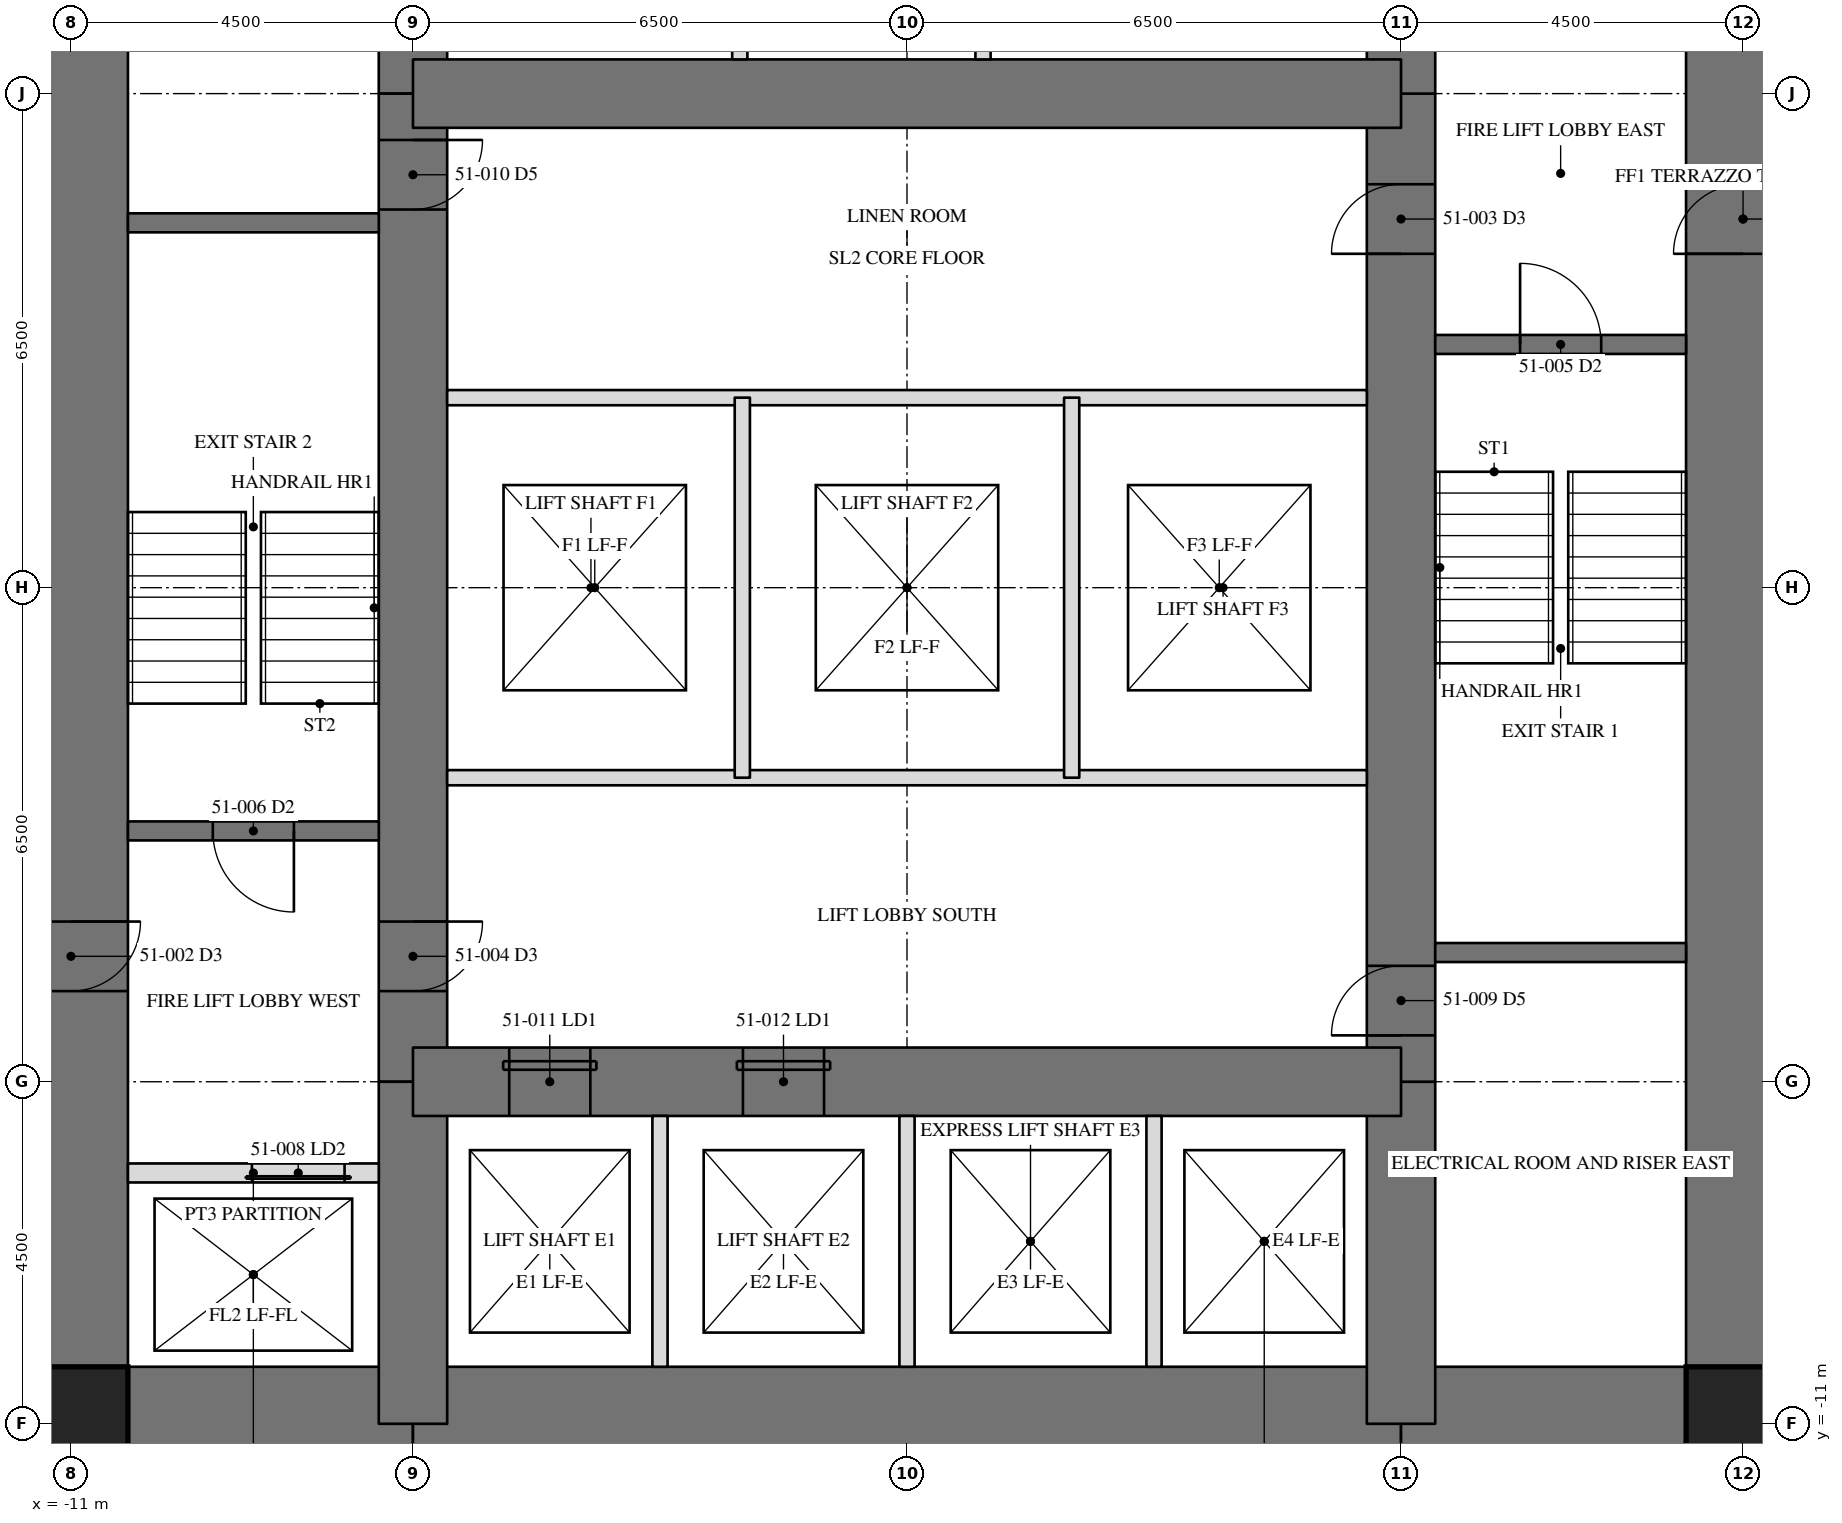
"""IFC4 building model, lengths in metres.
Left out: names, types, materials, properties, quantities, classifications, styles, units other than length and angle.
Written with IfcOpenShell. Run it as: python <this file> out.ifc"""

import sys

from ifc_helpers import new_model, si_unit, direction, frame, frame_2d, origin, origin_2d, place, context, subcontext, project, spatial, rectangle, hollow_rectangle, extrude, element, fill, save


model = new_model("IFC4")
c1 = context("Model", 3, precision=1e-05, world=origin(), true_north=direction((0.0, 1.0)))
c2 = subcontext(c1, "Body", "Model", "MODEL_VIEW")
j1 = project(units=[si_unit("LENGTHUNIT", "METRE"), si_unit("PLANEANGLEUNIT", "RADIAN")], contexts=[c1])
p1 = place(None, origin())
s1 = spatial("IfcSite", under=j1, at=p1, CompositionType="ELEMENT")
p2 = place(p1, origin())
s2 = spatial("IfcBuilding", under=s1, at=p2, CompositionType="ELEMENT")
p3 = place(p2, frame((0.0, 0.0, 215.2)))
s3 = spatial("IfcBuildingStorey", under=s2, at=p3, CompositionType="ELEMENT", Elevation=215.2)
p4 = place(p3, frame((11.0, -11.0, 0.0), z_axis=(0.0, 0.0, 1.0), x_axis=(0.0, 1.0, 0.0)))
e1 = element("IfcWall", 1, at=p4, inside=s3, PredefinedType="SHEAR", context=c2, shape_type="SweptSolid", body=[
    extrude(rectangle(XDim=22.0, YDim=1.5, at=frame_2d((11.0, 0.0))), origin(), (0.0, 0.0, 1.0), 3.5),
])
p5 = place(p4, frame((15.393, 0.0, 0.0)))
e2 = element("IfcOpeningElement", 2, at=p5, cuts=e1, PredefinedType="OPENING", context=c2, shape_type="SweptSolid", body=[
    extrude(rectangle(XDim=0.915, YDim=2.134, at=frame_2d((0.458, 1.067))), frame((0.0, 0.76, 0.0), z_axis=(0.0, -1.0, 0.0), x_axis=(1.0, 0.0, 0.0)), (0.0, 0.0, 1.0), 1.52),
])
p6 = place(p3, frame((-11.0, 11.0, 0.0), z_axis=(0.0, 0.0, 1.0), x_axis=(0.0, -1.0, 0.0)))
e3 = element("IfcWall", 3, at=p6, inside=s3, PredefinedType="SHEAR", context=c2, shape_type="SweptSolid", body=[
    extrude(rectangle(XDim=22.0, YDim=1.5, at=frame_2d((11.0, 0.0))), origin(), (0.0, 0.0, 1.0), 3.5),
])
p7 = place(p6, frame((15.393, 0.0, 0.0)))
e4 = element("IfcOpeningElement", 4, at=p7, cuts=e3, PredefinedType="OPENING", context=c2, shape_type="SweptSolid", body=[
    extrude(rectangle(XDim=0.915, YDim=2.134, at=frame_2d((0.458, 1.067))), frame((0.0, 0.76, 0.0), z_axis=(0.0, -1.0, 0.0), x_axis=(1.0, 0.0, 0.0)), (0.0, 0.0, 1.0), 1.52),
])
p8 = place(p3, frame((-11.0, -11.0, 0.0), z_axis=(0.0, 0.0, 1.0), x_axis=(1.0, 0.0, 0.0)))
e5 = element("IfcWall", 5, at=p8, inside=s3, PredefinedType="SHEAR", context=c2, shape_type="SweptSolid", body=[
    extrude(rectangle(XDim=4.5, YDim=1.5, at=frame_2d((2.25, 0.0))), origin(), (0.0, 0.0, 1.0), 3.5),
])
p9 = place(p3, frame((-6.5, -11.0, 0.0), z_axis=(0.0, 0.0, 1.0), x_axis=(1.0, 0.0, 0.0)))
e6 = element("IfcWall", 6, at=p9, inside=s3, PredefinedType="SHEAR", context=c2, shape_type="SweptSolid", body=[
    extrude(rectangle(XDim=13.0, YDim=1.5, at=frame_2d((6.5, 0.0))), origin(), (0.0, 0.0, 1.0), 3.5),
])
p10 = place(p3, frame((6.5, -11.0, 0.0), z_axis=(0.0, 0.0, 1.0), x_axis=(1.0, 0.0, 0.0)))
e7 = element("IfcWall", 7, at=p10, inside=s3, PredefinedType="SHEAR", context=c2, shape_type="SweptSolid", body=[
    extrude(rectangle(XDim=4.5, YDim=1.5, at=frame_2d((2.25, 0.0))), origin(), (0.0, 0.0, 1.0), 3.5),
])
p11 = place(p3, frame((6.5, -11.0, 0.0), z_axis=(0.0, 0.0, 1.0), x_axis=(0.0, 1.0, 0.0)))
e8 = element("IfcWall", 8, at=p11, inside=s3, PredefinedType="SHEAR", context=c2, shape_type="SweptSolid", body=[
    extrude(rectangle(XDim=4.5, YDim=0.9, at=frame_2d((2.25, 0.0))), origin(), (0.0, 0.0, 1.0), 3.5),
])
p12 = place(p3, frame((6.5, -6.5, 0.0), z_axis=(0.0, 0.0, 1.0), x_axis=(0.0, 1.0, 0.0)))
e9 = element("IfcWall", 9, at=p12, inside=s3, PredefinedType="SHEAR", context=c2, shape_type="SweptSolid", body=[
    extrude(rectangle(XDim=13.0, YDim=0.9, at=frame_2d((6.5, 0.0))), origin(), (0.0, 0.0, 1.0), 3.5),
])
p13 = place(p12, frame((10.893, 0.0, 0.0)))
e10 = element("IfcOpeningElement", 10, at=p13, cuts=e9, PredefinedType="OPENING", context=c2, shape_type="SweptSolid", body=[
    extrude(rectangle(XDim=0.915, YDim=2.134, at=frame_2d((0.458, 1.067))), frame((0.0, 0.46, 0.0), z_axis=(0.0, -1.0, 0.0), x_axis=(1.0, 0.0, 0.0)), (0.0, 0.0, 1.0), 0.92),
])
p14 = place(p12, frame((0.61, 0.0, 0.0)))
e11 = element("IfcOpeningElement", 11, at=p14, cuts=e9, PredefinedType="OPENING", context=c2, shape_type="SweptSolid", body=[
    extrude(rectangle(XDim=0.915, YDim=2.134, at=frame_2d((0.458, 1.067))), frame((0.0, 0.46, 0.0), z_axis=(0.0, -1.0, 0.0), x_axis=(1.0, 0.0, 0.0)), (0.0, 0.0, 1.0), 0.92),
])
for number, where, z_axis, x_axis in (
    (12, (6.5, 6.5, 0.0), (0.0, 0.0, 1.0), (0.0, 1.0, 0.0)),
    (13, (-6.5, 11.0, 0.0), (0.0, 0.0, 1.0), (0.0, -1.0, 0.0)),
):
    element("IfcWall", number, at=place(p3, frame(where, z_axis=z_axis, x_axis=x_axis)), inside=s3, PredefinedType="SHEAR", context=c2, shape_type="SweptSolid", body=[
        extrude(rectangle(XDim=4.5, YDim=0.9, at=frame_2d((2.25, 0.0))), origin(), (0.0, 0.0, 1.0), 3.5),
    ])
p15 = place(p3, frame((-6.5, 6.5, 0.0), z_axis=(0.0, 0.0, 1.0), x_axis=(0.0, -1.0, 0.0)))
e14 = element("IfcWall", 14, at=p15, inside=s3, PredefinedType="SHEAR", context=c2, shape_type="SweptSolid", body=[
    extrude(rectangle(XDim=13.0, YDim=0.9, at=frame_2d((6.5, 0.0))), origin(), (0.0, 0.0, 1.0), 3.5),
])
p16 = place(p15, frame((10.893, 0.0, 0.0)))
e15 = element("IfcOpeningElement", 15, at=p16, cuts=e14, PredefinedType="OPENING", context=c2, shape_type="SweptSolid", body=[
    extrude(rectangle(XDim=0.915, YDim=2.134, at=frame_2d((0.458, 1.067))), frame((0.0, 0.46, 0.0), z_axis=(0.0, -1.0, 0.0), x_axis=(1.0, 0.0, 0.0)), (0.0, 0.0, 1.0), 0.92),
])
p17 = place(p15, frame((0.61, 0.0, 0.0)))
e16 = element("IfcOpeningElement", 16, at=p17, cuts=e14, PredefinedType="OPENING", context=c2, shape_type="SweptSolid", body=[
    extrude(rectangle(XDim=0.915, YDim=2.134, at=frame_2d((0.458, 1.067))), frame((0.0, 0.46, 0.0), z_axis=(0.0, -1.0, 0.0), x_axis=(1.0, 0.0, 0.0)), (0.0, 0.0, 1.0), 0.92),
])
p18 = place(p3, frame((-6.5, -6.5, 0.0), z_axis=(0.0, 0.0, 1.0), x_axis=(0.0, -1.0, 0.0)))
e17 = element("IfcWall", 17, at=p18, inside=s3, PredefinedType="SHEAR", context=c2, shape_type="SweptSolid", body=[
    extrude(rectangle(XDim=4.5, YDim=0.9, at=frame_2d((2.25, 0.0))), origin(), (0.0, 0.0, 1.0), 3.5),
])
p19 = place(p3, frame((6.5, 6.5, 0.0), z_axis=(0.0, 0.0, 1.0), x_axis=(-1.0, 0.0, 0.0)))
e18 = element("IfcWall", 18, at=p19, inside=s3, PredefinedType="SHEAR", context=c2, shape_type="SweptSolid", body=[
    extrude(rectangle(XDim=13.0, YDim=0.9, at=frame_2d((6.5, 0.0))), origin(), (0.0, 0.0, 1.0), 3.5),
])
p20 = place(p3, frame((-6.5, -6.5, 0.0), z_axis=(0.0, 0.0, 1.0), x_axis=(1.0, 0.0, 0.0)))
e19 = element("IfcWall", 19, at=p20, inside=s3, PredefinedType="SHEAR", context=c2, shape_type="SweptSolid", body=[
    extrude(rectangle(XDim=13.0, YDim=0.9, at=frame_2d((6.5, 0.0))), origin(), (0.0, 0.0, 1.0), 3.5),
])
p21 = place(p20, frame((1.267, 0.0, 0.0)))
e20 = element("IfcOpeningElement", 20, at=p21, cuts=e19, PredefinedType="OPENING", context=c2, shape_type="SweptSolid", body=[
    extrude(rectangle(XDim=1.067, YDim=2.134, at=frame_2d((0.533, 1.067))), frame((0.0, 0.46, 0.0), z_axis=(0.0, -1.0, 0.0), x_axis=(1.0, 0.0, 0.0)), (0.0, 0.0, 1.0), 0.92),
])
p22 = place(p20, frame((4.342, 0.0, 0.0)))
e21 = element("IfcOpeningElement", 21, at=p22, cuts=e19, PredefinedType="OPENING", context=c2, shape_type="SweptSolid", body=[
    extrude(rectangle(XDim=1.067, YDim=2.134, at=frame_2d((0.533, 1.067))), frame((0.0, 0.46, 0.0), z_axis=(0.0, -1.0, 0.0), x_axis=(1.0, 0.0, 0.0)), (0.0, 0.0, 1.0), 0.92),
])
for number, where, z_axis, x_axis in (
    (22, (-11.0, -11.0, 0.0), (0.0, 0.0, 1.0), (1.0, 0.0, 0.0)),
    (23, (11.0, -11.0, 0.0), (0.0, 0.0, 1.0), (1.0, 0.0, 0.0)),
):
    element("IfcColumn", number, at=place(p3, frame(where, z_axis=z_axis, x_axis=x_axis)), inside=s3, PredefinedType="COLUMN", context=c2, shape_type="SweptSolid", body=[
        extrude(hollow_rectangle(XDim=1.499, YDim=1.499, WallThickness=0.102, at=origin_2d()), origin(), (0.0, 0.0, 1.0), 3.5),
    ])
for number, where, z_axis, x_axis in (
    (24, (6.95, -4.8, 0.0), (0.0, 0.0, 1.0), (1.0, 0.0, 0.0)),
    (25, (-6.95, 4.8, 0.0), (0.0, 0.0, 1.0), (-1.0, 0.0, 0.0)),
):
    element("IfcWall", number, at=place(p3, frame(where, z_axis=z_axis, x_axis=x_axis)), inside=s3, PredefinedType="SOLIDWALL", context=c2, shape_type="SweptSolid", body=[
        extrude(rectangle(XDim=3.3, YDim=0.25, at=frame_2d((1.65, 0.0))), origin(), (0.0, 0.0, 1.0), 3.31),
    ])
p23 = place(p3, frame((6.95, 3.2, 0.0), z_axis=(0.0, 0.0, 1.0), x_axis=(1.0, 0.0, 0.0)))
e26 = element("IfcWall", 26, at=p23, inside=s3, PredefinedType="SOLIDWALL", context=c2, shape_type="SweptSolid", body=[
    extrude(rectangle(XDim=3.3, YDim=0.25, at=frame_2d((1.65, 0.0))), origin(), (0.0, 0.0, 1.0), 3.31),
])
p24 = place(p23, frame((1.116, 0.0, 0.0)))
e27 = element("IfcOpeningElement", 27, at=p24, cuts=e26, PredefinedType="OPENING", context=c2, shape_type="SweptSolid", body=[
    extrude(rectangle(XDim=1.067, YDim=2.134, at=frame_2d((0.533, 1.067))), frame((0.0, 0.135, 0.0), z_axis=(0.0, -1.0, 0.0), x_axis=(1.0, 0.0, 0.0)), (0.0, 0.0, 1.0), 0.27),
])
p25 = place(p3, frame((-6.95, -3.2, 0.0), z_axis=(0.0, 0.0, 1.0), x_axis=(-1.0, 0.0, 0.0)))
e28 = element("IfcWall", 28, at=p25, inside=s3, PredefinedType="SOLIDWALL", context=c2, shape_type="SweptSolid", body=[
    extrude(rectangle(XDim=3.3, YDim=0.25, at=frame_2d((1.65, 0.0))), origin(), (0.0, 0.0, 1.0), 3.31),
])
p26 = place(p25, frame((1.116, 0.0, 0.0)))
e29 = element("IfcOpeningElement", 29, at=p26, cuts=e28, PredefinedType="OPENING", context=c2, shape_type="SweptSolid", body=[
    extrude(rectangle(XDim=1.067, YDim=2.134, at=frame_2d((0.533, 1.067))), frame((0.0, 0.135, 0.0), z_axis=(0.0, -1.0, 0.0), x_axis=(1.0, 0.0, 0.0)), (0.0, 0.0, 1.0), 0.27),
])
p27 = place(p3, frame((-6.95, -7.7, 0.0), z_axis=(0.0, 0.0, 1.0), x_axis=(-1.0, 0.0, 0.0)))
e30 = element("IfcWall", 30, at=p27, inside=s3, PredefinedType="PARTITIONING", context=c2, shape_type="SweptSolid", body=[
    extrude(rectangle(XDim=3.3, YDim=0.25, at=frame_2d((1.65, 0.0))), origin(), (0.0, 0.0, 1.0), 3.31),
])
p28 = place(p27, frame((0.45, 0.0, 0.0)))
e31 = element("IfcOpeningElement", 31, at=p28, cuts=e30, PredefinedType="OPENING", context=c2, shape_type="SweptSolid", body=[
    extrude(rectangle(XDim=1.219, YDim=2.134, at=frame_2d((0.609, 1.067))), frame((0.0, 0.135, 0.0), z_axis=(0.0, -1.0, 0.0), x_axis=(1.0, 0.0, 0.0)), (0.0, 0.0, 1.0), 0.27),
])
for number, where, z_axis, x_axis in (
    (32, (-6.05, 2.5, 0.0), (0.0, 0.0, 1.0), (1.0, 0.0, 0.0)),
    (33, (6.05, -2.5, 0.0), (0.0, 0.0, 1.0), (-1.0, 0.0, 0.0)),
):
    element("IfcWall", number, at=place(p3, frame(where, z_axis=z_axis, x_axis=x_axis)), inside=s3, PredefinedType="PARTITIONING", context=c2, shape_type="SweptSolid", body=[
        extrude(rectangle(XDim=12.1, YDim=0.2, at=frame_2d((6.05, 0.0))), origin(), (0.0, 0.0, 1.0), 3.31),
    ])
for number, where, z_axis, x_axis in (
    (34, (-3.25, -10.25, 0.0), (0.0, 0.0, 1.0), (0.0, 1.0, 0.0)),
    (35, (0.0, -10.25, 0.0), (0.0, 0.0, 1.0), (0.0, 1.0, 0.0)),
    (36, (3.25, -10.25, 0.0), (0.0, 0.0, 1.0), (0.0, 1.0, 0.0)),
):
    element("IfcWall", number, at=place(p3, frame(where, z_axis=z_axis, x_axis=x_axis)), inside=s3, PredefinedType="PARTITIONING", context=c2, shape_type="SweptSolid", body=[
        extrude(rectangle(XDim=3.3, YDim=0.2, at=frame_2d((1.65, 0.0))), origin(), (0.0, 0.0, 1.0), 3.31),
    ])
for number, where, z_axis, x_axis in (
    (37, (-2.167, -2.5, 0.0), (0.0, 0.0, 1.0), (0.0, 1.0, 0.0)),
    (38, (2.167, -2.5, 0.0), (0.0, 0.0, 1.0), (0.0, 1.0, 0.0)),
):
    element("IfcWall", number, at=place(p3, frame(where, z_axis=z_axis, x_axis=x_axis)), inside=s3, PredefinedType="PARTITIONING", context=c2, shape_type="SweptSolid", body=[
        extrude(rectangle(XDim=5.0, YDim=0.2, at=frame_2d((2.5, 0.0))), origin(), (0.0, 0.0, 1.0), 3.31),
    ])
p29 = place(p3, frame((-2.2, 6.95, 0.0), z_axis=(0.0, 0.0, 1.0), x_axis=(0.0, 1.0, 0.0)))
e39 = element("IfcWall", 39, at=p29, inside=s3, PredefinedType="PARTITIONING", context=c2, shape_type="SweptSolid", body=[
    extrude(rectangle(XDim=3.3, YDim=0.2, at=frame_2d((1.65, 0.0))), origin(), (0.0, 0.0, 1.0), 3.31),
])
p30 = place(p29, frame((1.192, 0.0, 0.0)))
e40 = element("IfcOpeningElement", 40, at=p30, cuts=e39, PredefinedType="OPENING", context=c2, shape_type="SweptSolid", body=[
    extrude(rectangle(XDim=0.915, YDim=2.134, at=frame_2d((0.458, 1.067))), frame((0.0, 0.11, 0.0), z_axis=(0.0, -1.0, 0.0), x_axis=(1.0, 0.0, 0.0)), (0.0, 0.0, 1.0), 0.22),
])
p31 = place(p3, frame((1.0, 6.95, 0.0), z_axis=(0.0, 0.0, 1.0), x_axis=(0.0, 1.0, 0.0)))
e41 = element("IfcWall", 41, at=p31, inside=s3, PredefinedType="PARTITIONING", context=c2, shape_type="SweptSolid", body=[
    extrude(rectangle(XDim=3.3, YDim=0.2, at=frame_2d((1.65, 0.0))), origin(), (0.0, 0.0, 1.0), 3.31),
])
p32 = place(p31, frame((1.192, 0.0, 0.0)))
e42 = element("IfcOpeningElement", 42, at=p32, cuts=e41, PredefinedType="OPENING", context=c2, shape_type="SweptSolid", body=[
    extrude(rectangle(XDim=0.915, YDim=2.134, at=frame_2d((0.458, 1.067))), frame((0.0, 0.11, 0.0), z_axis=(0.0, -1.0, 0.0), x_axis=(1.0, 0.0, 0.0)), (0.0, 0.0, 1.0), 0.22),
])
p33 = place(p13, origin())
e43 = element("IfcDoor", 43, at=p33, inside=s3, OperationType="SINGLE_SWING_RIGHT", PredefinedType="DOOR", context=c2, shape_type="SweptSolid", body=[
    extrude(rectangle(XDim=0.915, YDim=2.134, at=frame_2d((0.458, 1.067))), frame((0.0, -0.375, 0.0), z_axis=(0.0, -1.0, 0.0), x_axis=(1.0, 0.0, 0.0)), (0.0, 0.0, 1.0), 0.05),
])
fill(e10, e43)
p34 = place(p16, origin())
e44 = element("IfcDoor", 44, at=p34, inside=s3, OperationType="SINGLE_SWING_RIGHT", PredefinedType="DOOR", context=c2, shape_type="SweptSolid", body=[
    extrude(rectangle(XDim=0.915, YDim=2.134, at=frame_2d((0.458, 1.067))), frame((0.0, -0.375, 0.0), z_axis=(0.0, -1.0, 0.0), x_axis=(1.0, 0.0, 0.0)), (0.0, 0.0, 1.0), 0.05),
])
fill(e15, e44)
p35 = place(p24, origin())
e45 = element("IfcDoor", 45, at=p35, inside=s3, OperationType="SINGLE_SWING_LEFT", PredefinedType="DOOR", context=c2, shape_type="SweptSolid", body=[
    extrude(rectangle(XDim=1.067, YDim=2.134, at=frame_2d((0.533, 1.067))), frame((0.0, 0.025, 0.0), z_axis=(0.0, -1.0, 0.0), x_axis=(1.0, 0.0, 0.0)), (0.0, 0.0, 1.0), 0.05),
])
fill(e27, e45)
p36 = place(p26, origin())
e46 = element("IfcDoor", 46, at=p36, inside=s3, OperationType="SINGLE_SWING_LEFT", PredefinedType="DOOR", context=c2, shape_type="SweptSolid", body=[
    extrude(rectangle(XDim=1.067, YDim=2.134, at=frame_2d((0.533, 1.067))), frame((0.0, 0.025, 0.0), z_axis=(0.0, -1.0, 0.0), x_axis=(1.0, 0.0, 0.0)), (0.0, 0.0, 1.0), 0.05),
])
fill(e29, e46)
p37 = place(p28, origin())
e47 = element("IfcDoor", 47, at=p37, inside=s3, OperationType="SLIDING_TO_LEFT", PredefinedType="DOOR", context=c2, shape_type="SweptSolid", body=[
    extrude(rectangle(XDim=1.219, YDim=2.134, at=frame_2d((0.609, 1.067))), frame((0.0, 0.025, 0.0), z_axis=(0.0, -1.0, 0.0), x_axis=(1.0, 0.0, 0.0)), (0.0, 0.0, 1.0), 0.05),
])
fill(e31, e47)
p38 = place(p14, origin())
e48 = element("IfcDoor", 48, at=p38, inside=s3, OperationType="SINGLE_SWING_RIGHT", PredefinedType="DOOR", context=c2, shape_type="SweptSolid", body=[
    extrude(rectangle(XDim=0.915, YDim=2.134, at=frame_2d((0.458, 1.067))), frame((0.0, -0.375, 0.0), z_axis=(0.0, -1.0, 0.0), x_axis=(1.0, 0.0, 0.0)), (0.0, 0.0, 1.0), 0.05),
])
fill(e11, e48)
p39 = place(p17, origin())
e49 = element("IfcDoor", 49, at=p39, inside=s3, OperationType="SINGLE_SWING_RIGHT", PredefinedType="DOOR", context=c2, shape_type="SweptSolid", body=[
    extrude(rectangle(XDim=0.915, YDim=2.134, at=frame_2d((0.458, 1.067))), frame((0.0, -0.375, 0.0), z_axis=(0.0, -1.0, 0.0), x_axis=(1.0, 0.0, 0.0)), (0.0, 0.0, 1.0), 0.05),
])
fill(e16, e49)
p40 = place(p21, origin())
e50 = element("IfcDoor", 50, at=p40, inside=s3, OperationType="SLIDING_TO_LEFT", PredefinedType="DOOR", context=c2, shape_type="SweptSolid", body=[
    extrude(rectangle(XDim=1.067, YDim=2.134, at=frame_2d((0.533, 1.067))), frame((0.0, -0.375, 0.0), z_axis=(0.0, -1.0, 0.0), x_axis=(1.0, 0.0, 0.0)), (0.0, 0.0, 1.0), 0.05),
])
fill(e20, e50)
p41 = place(p22, origin())
e51 = element("IfcDoor", 51, at=p41, inside=s3, OperationType="SLIDING_TO_LEFT", PredefinedType="DOOR", context=c2, shape_type="SweptSolid", body=[
    extrude(rectangle(XDim=1.067, YDim=2.134, at=frame_2d((0.533, 1.067))), frame((0.0, -0.375, 0.0), z_axis=(0.0, -1.0, 0.0), x_axis=(1.0, 0.0, 0.0)), (0.0, 0.0, 1.0), 0.05),
])
fill(e21, e51)
save(model, sys.argv[1])
